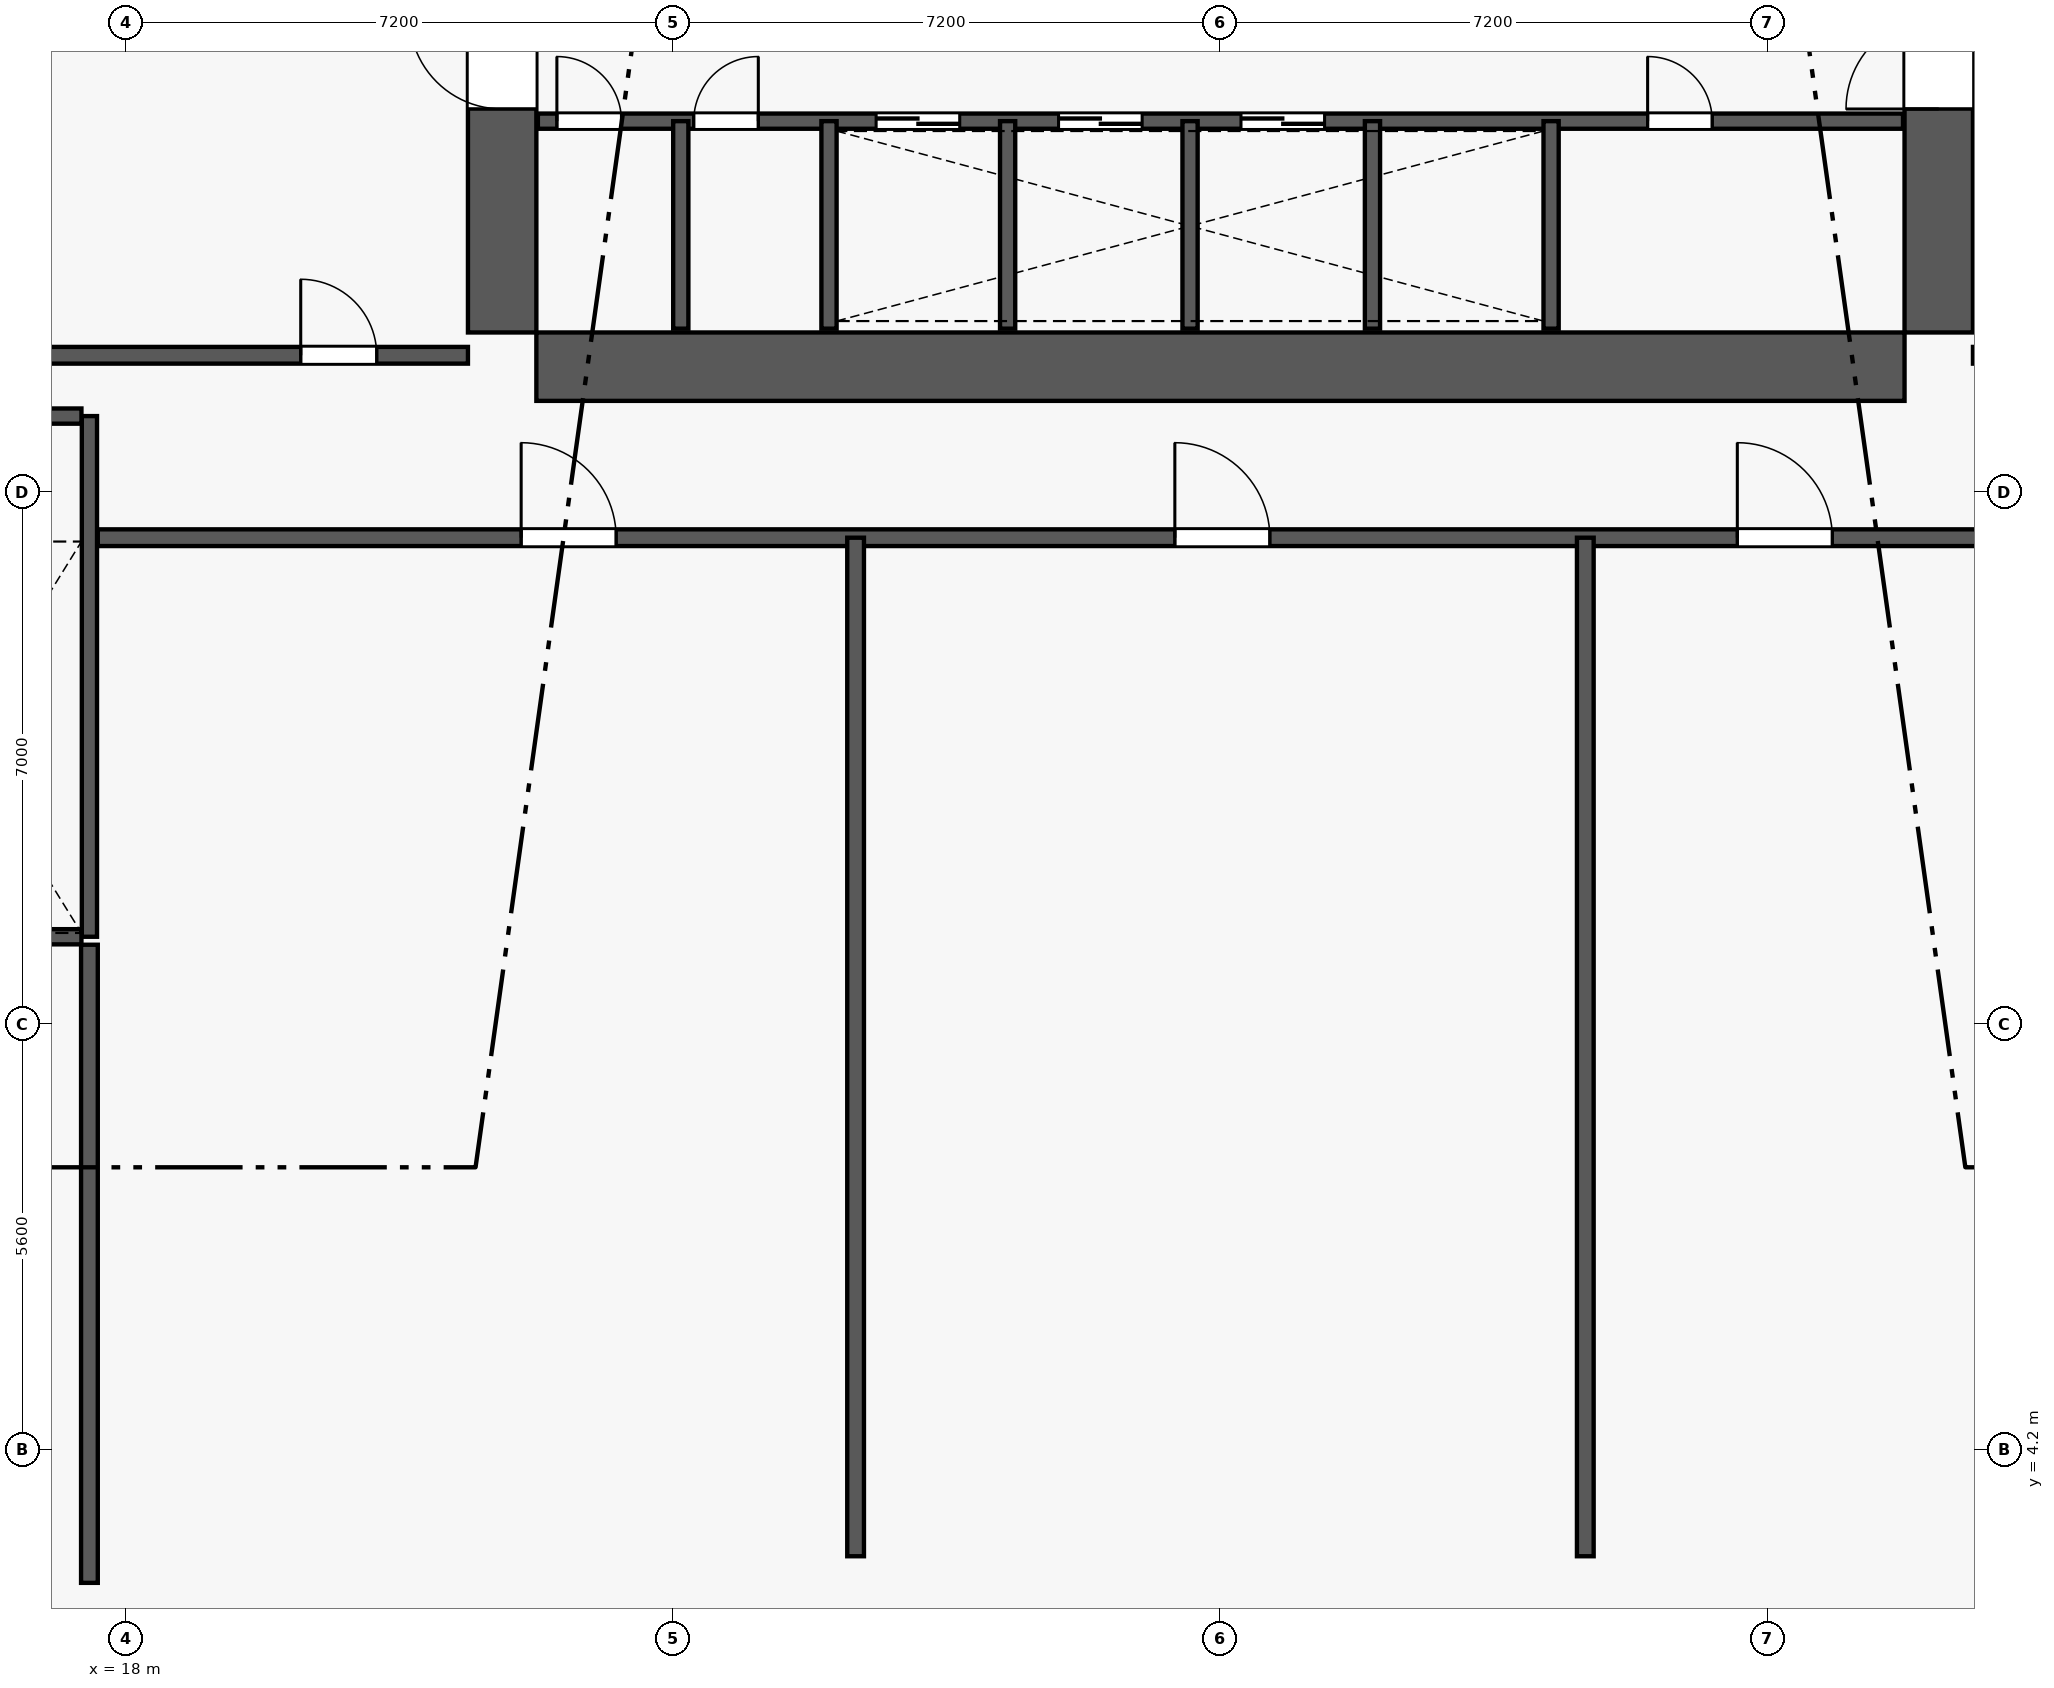
"""IFC4 building model, lengths in metres.
Left out: names, types, materials, properties, quantities, classifications, styles, units other than length and angle.
Written with IfcOpenShell. Run it as: python <this file> out.ifc"""

import sys

from ifc_helpers import new_model, si_unit, direction, frame, frame_2d, origin, origin_2d, place, context, subcontext, project, spatial, rectangle, extrude, element, fill, save


model = new_model("IFC4")
c1 = context("Model", 3, precision=1e-05, world=origin(), true_north=direction((0.0, 1.0)))
c2 = subcontext(c1, "Body", "Model", "MODEL_VIEW")
j1 = project(units=[si_unit("LENGTHUNIT", "METRE"), si_unit("PLANEANGLEUNIT", "RADIAN")], contexts=[c1])
p1 = place(None, origin())
s1 = spatial("IfcSite", under=j1, at=p1, CompositionType="ELEMENT")
p2 = place(p1, origin())
s2 = spatial("IfcBuilding", under=s1, at=p2, CompositionType="ELEMENT")
p3 = place(p2, frame((0.0, 0.0, 19.5)))
s3 = spatial("IfcBuildingStorey", under=s2, at=p3, CompositionType="ELEMENT", Elevation=19.5)
for number, where, z_axis, x_axis in (
    (1, (22.95, 18.45, 0.0), (0.0, 0.0, 1.0), (1.0, 0.0, 0.0)),
    (2, (41.85, 18.45, 0.0), (0.0, 0.0, 1.0), (1.0, 0.0, 0.0)),
):
    element("IfcColumn", number, at=place(p3, frame(where, z_axis=z_axis, x_axis=x_axis)), inside=s3, PredefinedType="COLUMN", context=c2, shape_type="SweptSolid", body=[
        extrude(rectangle(XDim=0.9, YDim=0.9, at=origin_2d()), origin(), (0.0, 0.0, 1.0), 5.4),
    ])
p4 = place(p3, frame((23.4, 18.45, 0.0), z_axis=(0.0, 0.0, 1.0), x_axis=(1.0, 0.0, 0.0)))
e3 = element("IfcWall", 3, at=p4, inside=s3, PredefinedType="SHEAR", context=c2, shape_type="SweptSolid", body=[
    extrude(rectangle(XDim=18.0, YDim=0.9, at=frame_2d((9.0, 0.0))), origin(), (0.0, 0.0, 1.0), 5.18),
])
p5 = place(p3, frame((22.95, 18.9, 0.0), z_axis=(0.0, 0.0, 1.0), x_axis=(0.0, 1.0, 0.0)))
e4 = element("IfcWall", 4, at=p5, inside=s3, PredefinedType="SHEAR", context=c2, shape_type="SweptSolid", body=[
    extrude(rectangle(XDim=14.0, YDim=0.9, at=frame_2d((7.0, 0.0))), origin(), (0.0, 0.0, 1.0), 5.18),
])
p6 = place(p5, frame((2.94, 0.0, 0.0)))
e5 = element("IfcOpeningElement", 5, at=p6, cuts=e4, PredefinedType="OPENING", context=c2, shape_type="SweptSolid", body=[
    extrude(rectangle(XDim=1.22, YDim=2.25, at=frame_2d((0.61, 1.125))), frame((0.0, 0.46, 0.0), z_axis=(0.0, -1.0, 0.0), x_axis=(1.0, 0.0, 0.0)), (0.0, 0.0, 1.0), 0.92),
])
p7 = place(p3, frame((41.85, 18.9, 0.0), z_axis=(0.0, 0.0, 1.0), x_axis=(0.0, 1.0, 0.0)))
e6 = element("IfcWall", 6, at=p7, inside=s3, PredefinedType="SHEAR", context=c2, shape_type="SweptSolid", body=[
    extrude(rectangle(XDim=14.0, YDim=0.9, at=frame_2d((7.0, 0.0))), origin(), (0.0, 0.0, 1.0), 5.18),
])
p8 = place(p7, frame((2.94, 0.0, 0.0)))
e7 = element("IfcOpeningElement", 7, at=p8, cuts=e6, PredefinedType="OPENING", context=c2, shape_type="SweptSolid", body=[
    extrude(rectangle(XDim=1.22, YDim=2.25, at=frame_2d((0.61, 1.125))), frame((0.0, 0.46, 0.0), z_axis=(0.0, -1.0, 0.0), x_axis=(1.0, 0.0, 0.0)), (0.0, 0.0, 1.0), 0.92),
])
for number, where, z_axis, x_axis in (
    (8, (23.555, 1.317, 0.0), (0.0, 0.0, 1.0), (1.0, 0.0, 0.0)),
    (9, (41.245, 1.317, 0.0), (0.0, 0.0, 1.0), (1.0, 0.0, 0.0)),
):
    element("IfcColumn", number, at=place(p3, frame(where, z_axis=z_axis, x_axis=x_axis)), inside=s3, PredefinedType="COLUMN", context=c2, shape_type="SweptSolid", body=[
        extrude(rectangle(XDim=1.8, YDim=1.8, at=origin_2d()), origin(), (0.0, 0.0, 1.0), 5.4),
    ])
p9 = place(p3, frame((23.42, 21.68, 0.0), z_axis=(0.0, 0.0, 1.0), x_axis=(1.0, 0.0, 0.0)))
e10 = element("IfcWall", 10, at=p9, inside=s3, PredefinedType="PLUMBINGWALL", context=c2, shape_type="SweptSolid", body=[
    extrude(rectangle(XDim=17.96, YDim=0.2, at=frame_2d((8.98, 0.0))), origin(), (0.0, 0.0, 1.0), 5.18),
])
p10 = place(p9, frame((4.45, 0.0, 0.0)))
e11 = element("IfcOpeningElement", 11, at=p10, cuts=e10, PredefinedType="OPENING", context=c2, shape_type="SweptSolid", body=[
    extrude(rectangle(XDim=1.1, YDim=2.2, at=frame_2d((0.55, 1.1))), frame((0.0, 0.11, 0.0), z_axis=(0.0, -1.0, 0.0), x_axis=(1.0, 0.0, 0.0)), (0.0, 0.0, 1.0), 0.22),
])
p11 = place(p9, frame((6.85, 0.0, 0.0)))
e12 = element("IfcOpeningElement", 12, at=p11, cuts=e10, PredefinedType="OPENING", context=c2, shape_type="SweptSolid", body=[
    extrude(rectangle(XDim=1.1, YDim=2.2, at=frame_2d((0.55, 1.1))), frame((0.0, 0.11, 0.0), z_axis=(0.0, -1.0, 0.0), x_axis=(1.0, 0.0, 0.0)), (0.0, 0.0, 1.0), 0.22),
])
p12 = place(p9, frame((9.25, 0.0, 0.0)))
e13 = element("IfcOpeningElement", 13, at=p12, cuts=e10, PredefinedType="OPENING", context=c2, shape_type="SweptSolid", body=[
    extrude(rectangle(XDim=1.1, YDim=2.2, at=frame_2d((0.55, 1.1))), frame((0.0, 0.11, 0.0), z_axis=(0.0, -1.0, 0.0), x_axis=(1.0, 0.0, 0.0)), (0.0, 0.0, 1.0), 0.22),
])
p13 = place(p9, frame((0.25, 0.0, 0.0)))
e14 = element("IfcOpeningElement", 14, at=p13, cuts=e10, PredefinedType="OPENING", context=c2, shape_type="SweptSolid", body=[
    extrude(rectangle(XDim=0.85, YDim=2.05, at=frame_2d((0.425, 1.025))), frame((0.0, 0.11, 0.0), z_axis=(0.0, -1.0, 0.0), x_axis=(1.0, 0.0, 0.0)), (0.0, 0.0, 1.0), 0.22),
])
p14 = place(p9, frame((2.05, 0.0, 0.0)))
e15 = element("IfcOpeningElement", 15, at=p14, cuts=e10, PredefinedType="OPENING", context=c2, shape_type="SweptSolid", body=[
    extrude(rectangle(XDim=0.85, YDim=2.05, at=frame_2d((0.425, 1.025))), frame((0.0, 0.11, 0.0), z_axis=(0.0, -1.0, 0.0), x_axis=(1.0, 0.0, 0.0)), (0.0, 0.0, 1.0), 0.22),
])
p15 = place(p9, frame((14.6, 0.0, 0.0)))
e16 = element("IfcOpeningElement", 16, at=p15, cuts=e10, PredefinedType="OPENING", context=c2, shape_type="SweptSolid", body=[
    extrude(rectangle(XDim=0.85, YDim=2.05, at=frame_2d((0.425, 1.025))), frame((0.0, 0.11, 0.0), z_axis=(0.0, -1.0, 0.0), x_axis=(1.0, 0.0, 0.0)), (0.0, 0.0, 1.0), 0.22),
])
for number, where, z_axis, x_axis in (
    (17, (27.25, 18.95, 0.0), (0.0, 0.0, 1.0), (0.0, 1.0, 0.0)),
    (18, (29.6, 18.95, 0.0), (0.0, 0.0, 1.0), (0.0, 1.0, 0.0)),
    (19, (32.0, 18.95, 0.0), (0.0, 0.0, 1.0), (0.0, 1.0, 0.0)),
    (20, (34.4, 18.95, 0.0), (0.0, 0.0, 1.0), (0.0, 1.0, 0.0)),
    (21, (36.75, 18.95, 0.0), (0.0, 0.0, 1.0), (0.0, 1.0, 0.0)),
    (22, (25.3, 18.95, 0.0), (0.0, 0.0, 1.0), (0.0, 1.0, 0.0)),
):
    element("IfcWall", number, at=place(p3, frame(where, z_axis=z_axis, x_axis=x_axis)), inside=s3, PredefinedType="PLUMBINGWALL", context=c2, shape_type="SweptSolid", body=[
        extrude(rectangle(XDim=2.73, YDim=0.2, at=frame_2d((1.365, 0.0))), origin(), (0.0, 0.0, 1.0), 5.18),
    ])
p16 = place(p3, frame((17.52, 10.95, 0.0), z_axis=(0.0, 0.0, 1.0), x_axis=(0.0, 1.0, 0.0)))
e23 = element("IfcWall", 23, at=p16, inside=s3, PredefinedType="SHEAR", context=c2, shape_type="SweptSolid", body=[
    extrude(rectangle(XDim=6.85, YDim=0.2, at=frame_2d((3.425, 0.0))), origin(), (0.0, 0.0, 1.0), 5.4),
])
p17 = place(p3, frame((14.225, 10.95, 0.0), z_axis=(0.0, 0.0, 1.0), x_axis=(1.0, 0.0, 0.0)))
e24 = element("IfcWall", 24, at=p17, inside=s3, PredefinedType="PLUMBINGWALL", context=c2, shape_type="SweptSolid", body=[
    extrude(rectangle(XDim=3.19, YDim=0.2, at=frame_2d((1.595, 0.0))), origin(), (0.0, 0.0, 1.0), 5.18),
])
p18 = place(p3, frame((14.225, 17.8, 0.0), z_axis=(0.0, 0.0, 1.0), x_axis=(1.0, 0.0, 0.0)))
e25 = element("IfcWall", 25, at=p18, inside=s3, PredefinedType="PLUMBINGWALL", context=c2, shape_type="SweptSolid", body=[
    extrude(rectangle(XDim=3.19, YDim=0.2, at=frame_2d((1.595, 0.0))), origin(), (0.0, 0.0, 1.0), 3.79),
])
p19 = place(p18, frame((1.05, 0.0, 0.0)))
e26 = element("IfcOpeningElement", 26, at=p19, cuts=e25, PredefinedType="OPENING", context=c2, shape_type="SweptSolid", body=[
    extrude(rectangle(XDim=1.05, YDim=2.15, at=frame_2d((0.525, 1.075))), frame((0.0, 0.11, 0.0), z_axis=(0.0, -1.0, 0.0), x_axis=(1.0, 0.0, 0.0)), (0.0, 0.0, 1.0), 0.22),
])
p20 = place(p3, frame((6.925, 18.6, 0.0), z_axis=(0.0, 0.0, 1.0), x_axis=(1.0, 0.0, 0.0)))
e27 = element("IfcWall", 27, at=p20, inside=s3, PredefinedType="PARTITIONING", context=c2, shape_type="SweptSolid", body=[
    extrude(rectangle(XDim=15.575, YDim=0.22, at=frame_2d((7.788, 0.0))), origin(), (0.0, 0.0, 1.0), 3.79),
])
p21 = place(p20, frame((13.375, 0.0, 0.0)))
e28 = element("IfcOpeningElement", 28, at=p21, cuts=e27, PredefinedType="OPENING", context=c2, shape_type="SweptSolid", body=[
    extrude(rectangle(XDim=1.0, YDim=2.15, at=frame_2d((0.5, 1.075))), frame((0.0, 0.12, 0.0), z_axis=(0.0, -1.0, 0.0), x_axis=(1.0, 0.0, 0.0)), (0.0, 0.0, 1.0), 0.24),
])
p22 = place(p3, frame((42.3, 18.6, 0.0), z_axis=(0.0, 0.0, 1.0), x_axis=(1.0, 0.0, 0.0)))
e29 = element("IfcWall", 29, at=p22, inside=s3, PredefinedType="PARTITIONING", context=c2, shape_type="SweptSolid", body=[
    extrude(rectangle(XDim=15.575, YDim=0.22, at=frame_2d((7.788, 0.0))), origin(), (0.0, 0.0, 1.0), 3.79),
])
p23 = place(p22, frame((0.5, 0.0, 0.0)))
e30 = element("IfcOpeningElement", 30, at=p23, cuts=e29, PredefinedType="OPENING", context=c2, shape_type="SweptSolid", body=[
    extrude(rectangle(XDim=1.0, YDim=2.15, at=frame_2d((0.5, 1.075))), frame((0.0, 0.12, 0.0), z_axis=(0.0, -1.0, 0.0), x_axis=(1.0, 0.0, 0.0)), (0.0, 0.0, 1.0), 0.24),
])
p24 = place(p3, frame((17.63, 16.2, 0.0), z_axis=(0.0, 0.0, 1.0), x_axis=(1.0, 0.0, 0.0)))
e31 = element("IfcWall", 31, at=p24, inside=s3, PredefinedType="PARTITIONING", context=c2, shape_type="SweptSolid", body=[
    extrude(rectangle(XDim=29.58, YDim=0.22, at=frame_2d((14.79, 0.0))), origin(), (0.0, 0.0, 1.0), 5.18),
])
p25 = place(p24, frame((5.57, 0.0, 0.0)))
e32 = element("IfcOpeningElement", 32, at=p25, cuts=e31, PredefinedType="OPENING", context=c2, shape_type="SweptSolid", body=[
    extrude(rectangle(XDim=1.25, YDim=2.25, at=frame_2d((0.625, 1.125))), frame((0.0, 0.12, 0.0), z_axis=(0.0, -1.0, 0.0), x_axis=(1.0, 0.0, 0.0)), (0.0, 0.0, 1.0), 0.24),
])
p26 = place(p24, frame((14.17, 0.0, 0.0)))
e33 = element("IfcOpeningElement", 33, at=p26, cuts=e31, PredefinedType="OPENING", context=c2, shape_type="SweptSolid", body=[
    extrude(rectangle(XDim=1.25, YDim=2.25, at=frame_2d((0.625, 1.125))), frame((0.0, 0.12, 0.0), z_axis=(0.0, -1.0, 0.0), x_axis=(1.0, 0.0, 0.0)), (0.0, 0.0, 1.0), 0.24),
])
p27 = place(p24, frame((21.57, 0.0, 0.0)))
e34 = element("IfcOpeningElement", 34, at=p27, cuts=e31, PredefinedType="OPENING", context=c2, shape_type="SweptSolid", body=[
    extrude(rectangle(XDim=1.25, YDim=2.25, at=frame_2d((0.625, 1.125))), frame((0.0, 0.12, 0.0), z_axis=(0.0, -1.0, 0.0), x_axis=(1.0, 0.0, 0.0)), (0.0, 0.0, 1.0), 0.24),
])
p28 = place(p3, frame((17.52, 2.45, 0.0), z_axis=(0.0, 0.0, 1.0), x_axis=(0.0, 1.0, 0.0)))
e35 = element("IfcWall", 35, at=p28, inside=s3, PredefinedType="PARTITIONING", context=c2, shape_type="SweptSolid", body=[
    extrude(rectangle(XDim=8.395, YDim=0.22, at=frame_2d((4.198, 0.0))), origin(), (0.0, 0.0, 1.0), 3.79),
])
for number, where, z_axis, x_axis in (
    (36, (27.6, 2.8, 0.0), (0.0, 0.0, 1.0), (0.0, 1.0, 0.0)),
    (37, (37.2, 2.8, 0.0), (0.0, 0.0, 1.0), (0.0, 1.0, 0.0)),
):
    element("IfcWall", number, at=place(p3, frame(where, z_axis=z_axis, x_axis=x_axis)), inside=s3, PredefinedType="PARTITIONING", context=c2, shape_type="SweptSolid", body=[
        extrude(rectangle(XDim=13.4, YDim=0.22, at=frame_2d((6.7, 0.0))), origin(), (0.0, 0.0, 1.0), 5.18),
    ])
p29 = place(p6, origin())
e38 = element("IfcDoor", 38, at=p29, inside=s3, OperationType="SINGLE_SWING_RIGHT", PredefinedType="DOOR", context=c2, shape_type="SweptSolid", body=[
    extrude(rectangle(XDim=1.22, YDim=2.25, at=frame_2d((0.61, 1.125))), frame((0.0, 0.025, 0.0), z_axis=(0.0, -1.0, 0.0), x_axis=(1.0, 0.0, 0.0)), (0.0, 0.0, 1.0), 0.05),
])
fill(e5, e38)
p30 = place(p8, origin())
e39 = element("IfcDoor", 39, at=p30, inside=s3, OperationType="SINGLE_SWING_LEFT", PredefinedType="DOOR", context=c2, shape_type="SweptSolid", body=[
    extrude(rectangle(XDim=1.22, YDim=2.25, at=frame_2d((0.61, 1.125))), frame((0.0, 0.025, 0.0), z_axis=(0.0, -1.0, 0.0), x_axis=(1.0, 0.0, 0.0)), (0.0, 0.0, 1.0), 0.05),
])
fill(e7, e39)
p31 = place(p10, origin())
e40 = element("IfcDoor", 40, at=p31, inside=s3, OperationType="DOUBLE_DOOR_SLIDING", PredefinedType="DOOR", context=c2, shape_type="SweptSolid", body=[
    extrude(rectangle(XDim=1.1, YDim=2.2, at=frame_2d((0.55, 1.1))), frame((0.0, 0.025, 0.0), z_axis=(0.0, -1.0, 0.0), x_axis=(1.0, 0.0, 0.0)), (0.0, 0.0, 1.0), 0.05),
])
fill(e11, e40)
p32 = place(p11, origin())
e41 = element("IfcDoor", 41, at=p32, inside=s3, OperationType="DOUBLE_DOOR_SLIDING", PredefinedType="DOOR", context=c2, shape_type="SweptSolid", body=[
    extrude(rectangle(XDim=1.1, YDim=2.2, at=frame_2d((0.55, 1.1))), frame((0.0, 0.025, 0.0), z_axis=(0.0, -1.0, 0.0), x_axis=(1.0, 0.0, 0.0)), (0.0, 0.0, 1.0), 0.05),
])
fill(e12, e41)
p33 = place(p12, origin())
e42 = element("IfcDoor", 42, at=p33, inside=s3, OperationType="DOUBLE_DOOR_SLIDING", PredefinedType="DOOR", context=c2, shape_type="SweptSolid", body=[
    extrude(rectangle(XDim=1.1, YDim=2.2, at=frame_2d((0.55, 1.1))), frame((0.0, 0.025, 0.0), z_axis=(0.0, -1.0, 0.0), x_axis=(1.0, 0.0, 0.0)), (0.0, 0.0, 1.0), 0.05),
])
fill(e13, e42)
p34 = place(p13, origin())
e43 = element("IfcDoor", 43, at=p34, inside=s3, OperationType="SINGLE_SWING_LEFT", PredefinedType="DOOR", context=c2, shape_type="SweptSolid", body=[
    extrude(rectangle(XDim=0.85, YDim=2.05, at=frame_2d((0.425, 1.025))), frame((0.0, 0.025, 0.0), z_axis=(0.0, -1.0, 0.0), x_axis=(1.0, 0.0, 0.0)), (0.0, 0.0, 1.0), 0.05),
])
fill(e14, e43)
p35 = place(p14, origin())
e44 = element("IfcDoor", 44, at=p35, inside=s3, OperationType="SINGLE_SWING_RIGHT", PredefinedType="DOOR", context=c2, shape_type="SweptSolid", body=[
    extrude(rectangle(XDim=0.85, YDim=2.05, at=frame_2d((0.425, 1.025))), frame((0.0, 0.025, 0.0), z_axis=(0.0, -1.0, 0.0), x_axis=(1.0, 0.0, 0.0)), (0.0, 0.0, 1.0), 0.05),
])
fill(e15, e44)
p36 = place(p15, origin())
e45 = element("IfcDoor", 45, at=p36, inside=s3, OperationType="SINGLE_SWING_LEFT", PredefinedType="DOOR", context=c2, shape_type="SweptSolid", body=[
    extrude(rectangle(XDim=0.85, YDim=2.05, at=frame_2d((0.425, 1.025))), frame((0.0, 0.025, 0.0), z_axis=(0.0, -1.0, 0.0), x_axis=(1.0, 0.0, 0.0)), (0.0, 0.0, 1.0), 0.05),
])
fill(e16, e45)
p37 = place(p21, origin())
e46 = element("IfcDoor", 46, at=p37, inside=s3, OperationType="SINGLE_SWING_LEFT", PredefinedType="DOOR", context=c2, shape_type="SweptSolid", body=[
    extrude(rectangle(XDim=1.0, YDim=2.15, at=frame_2d((0.5, 1.075))), frame((0.0, 0.025, 0.0), z_axis=(0.0, -1.0, 0.0), x_axis=(1.0, 0.0, 0.0)), (0.0, 0.0, 1.0), 0.05),
])
fill(e28, e46)
p38 = place(p25, origin())
e47 = element("IfcDoor", 47, at=p38, inside=s3, OperationType="SINGLE_SWING_LEFT", PredefinedType="DOOR", context=c2, shape_type="SweptSolid", body=[
    extrude(rectangle(XDim=1.25, YDim=2.25, at=frame_2d((0.625, 1.125))), frame((0.0, 0.025, 0.0), z_axis=(0.0, -1.0, 0.0), x_axis=(1.0, 0.0, 0.0)), (0.0, 0.0, 1.0), 0.05),
])
fill(e32, e47)
p39 = place(p26, origin())
e48 = element("IfcDoor", 48, at=p39, inside=s3, OperationType="SINGLE_SWING_LEFT", PredefinedType="DOOR", context=c2, shape_type="SweptSolid", body=[
    extrude(rectangle(XDim=1.25, YDim=2.25, at=frame_2d((0.625, 1.125))), frame((0.0, 0.025, 0.0), z_axis=(0.0, -1.0, 0.0), x_axis=(1.0, 0.0, 0.0)), (0.0, 0.0, 1.0), 0.05),
])
fill(e33, e48)
p40 = place(p27, origin())
e49 = element("IfcDoor", 49, at=p40, inside=s3, OperationType="SINGLE_SWING_LEFT", PredefinedType="DOOR", context=c2, shape_type="SweptSolid", body=[
    extrude(rectangle(XDim=1.25, YDim=2.25, at=frame_2d((0.625, 1.125))), frame((0.0, 0.025, 0.0), z_axis=(0.0, -1.0, 0.0), x_axis=(1.0, 0.0, 0.0)), (0.0, 0.0, 1.0), 0.05),
])
fill(e34, e49)
save(model, sys.argv[1])
